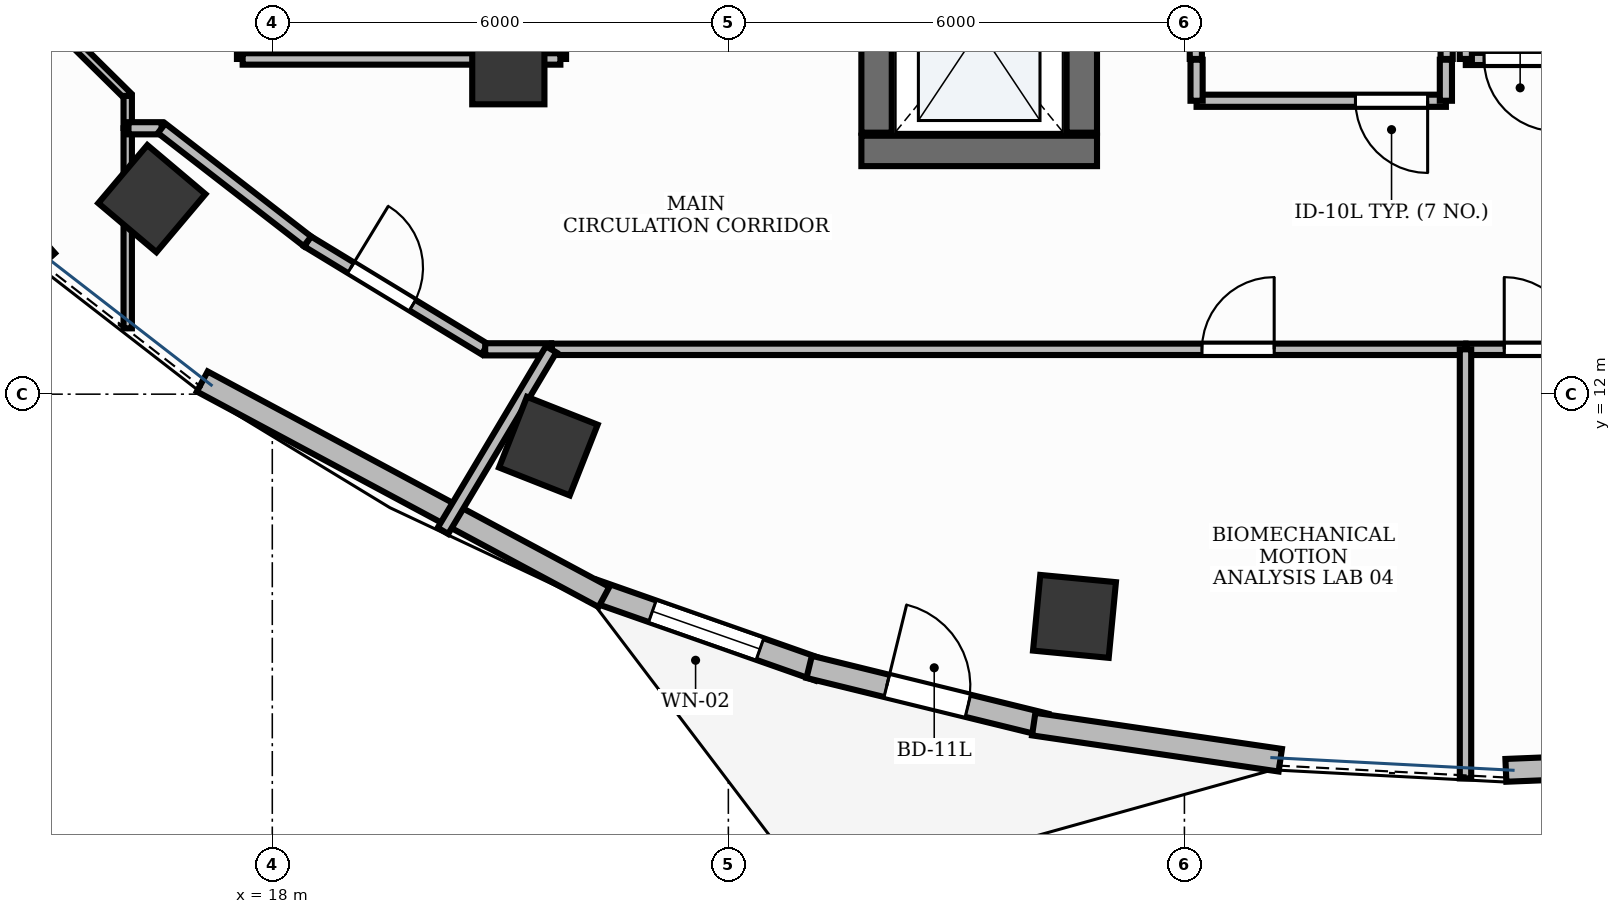
"""IFC4 building model, lengths in metres.
Left out: names, types, materials, properties, quantities, classifications, styles, units other than length and angle.
Written with IfcOpenShell. Run it as: python <this file> out.ifc"""

import sys

from ifc_helpers import new_model, si_unit, direction, frame, frame_2d, origin, origin_2d, place, context, subcontext, project, spatial, rectangle, extrude, element, fill, save


model = new_model("IFC4")
c1 = context("Model", 3, precision=1e-05, world=origin(), true_north=direction((0.0, 1.0)))
c2 = subcontext(c1, "Body", "Model", "MODEL_VIEW")
j1 = project(units=[si_unit("LENGTHUNIT", "METRE"), si_unit("PLANEANGLEUNIT", "RADIAN")], contexts=[c1])
p1 = place(None, origin())
s1 = spatial("IfcSite", under=j1, at=p1, CompositionType="ELEMENT")
p2 = place(p1, origin())
s2 = spatial("IfcBuilding", under=s1, at=p2, CompositionType="ELEMENT")
p3 = place(p2, frame((0.0, 0.0, 208.8)))
s3 = spatial("IfcBuildingStorey", under=s2, at=p3, CompositionType="ELEMENT", Elevation=208.8)
p4 = place(p3, frame((25.75, 15.2, 0.0), z_axis=(0.0, 0.0, 1.0), x_axis=(1.0, 0.0, 0.0)))
e1 = element("IfcWall", 1, at=p4, inside=s3, PredefinedType="SHEAR", context=c2, shape_type="SweptSolid", body=[
    extrude(rectangle(XDim=3.1, YDim=0.4, at=frame_2d((1.55, 0.0))), origin(), (0.0, 0.0, 1.0), 3.88),
])
for number, where, z_axis, x_axis in (
    (2, (25.95, 15.44, 0.0), (0.0, 0.0, 1.0), (0.0, 1.0, 0.0)),
    (3, (28.65, 15.44, 0.0), (0.0, 0.0, 1.0), (0.0, 1.0, 0.0)),
):
    element("IfcWall", number, at=place(p3, frame(where, z_axis=z_axis, x_axis=x_axis)), inside=s3, PredefinedType="SHEAR", context=c2, shape_type="SweptSolid", body=[
        extrude(rectangle(XDim=2.7, YDim=0.4, at=frame_2d((1.35, 0.0))), origin(), (0.0, 0.0, 1.0), 3.88),
    ])
p5 = place(p3, frame((16.416, 14.573, -0.0), z_axis=(0.0, 0.0, 1.0), x_axis=(-0.764246456939, 0.644924300253, 0.0)))
e4 = element("IfcColumn", 4, at=p5, inside=s3, PredefinedType="COLUMN", context=c2, shape_type="SweptSolid", body=[
    extrude(rectangle(XDim=1.0, YDim=1.0, at=origin_2d()), origin(), (0.0, 0.0, 1.0), 3.881),
])
p6 = place(p3, frame((21.105, 16.288, -0.0), z_axis=(0.0, 0.0, 1.0), x_axis=(1.0, 0.0, 0.0)))
e5 = element("IfcColumn", 5, at=p6, inside=s3, PredefinedType="COLUMN", context=c2, shape_type="SweptSolid", body=[
    extrude(rectangle(XDim=0.95, YDim=0.95, at=origin_2d()), origin(), (0.0, 0.0, 1.0), 3.881),
])
for number, where, z_axis, x_axis in (
    (6, (21.632, 11.316, -0.0), (0.0, 0.0, 1.0), (-0.93, 0.367, 0.0)),
    (7, (28.554, 9.076, -0.0), (0.0, 0.0, 1.0), (-0.995, 0.095, 0.0)),
):
    element("IfcColumn", number, at=place(p3, frame(where, z_axis=z_axis, x_axis=x_axis)), inside=s3, PredefinedType="COLUMN", context=c2, shape_type="SweptSolid", body=[
        extrude(rectangle(XDim=1.0, YDim=1.0, at=origin_2d()), origin(), (0.0, 0.0, 1.0), 3.881),
    ])
p7 = place(p3, frame((22.223, 9.417, 0.0), z_axis=(0.0, 0.0, 1.0), x_axis=(0.94341621231, -0.331610992506, 0.0)))
e8 = element("IfcWall", 8, at=p7, inside=s3, PredefinedType="STANDARD", context=c2, shape_type="SweptSolid", body=[
    extrude(rectangle(XDim=3.148, YDim=0.3, at=frame_2d((1.574, 0.0))), origin(), (0.0, 0.0, 1.0), 3.88),
])
p8 = place(p7, frame((0.824, 0.0, 0.95)))
e9 = element("IfcOpeningElement", 9, at=p8, cuts=e8, PredefinedType="OPENING", context=c2, shape_type="SweptSolid", body=[
    extrude(rectangle(XDim=1.5, YDim=1.8, at=frame_2d((0.75, 0.9))), frame((0.0, 0.165, 0.0), z_axis=(0.0, -1.0, 0.0), x_axis=(1.0, 0.0, 0.0)), (0.0, 0.0, 1.0), 0.33),
])
p9 = place(p3, frame((25.063, 8.412, 0.0), z_axis=(0.0, 0.0, 1.0), x_axis=(0.971262421812, -0.238011150948, 0.0)))
e10 = element("IfcWall", 10, at=p9, inside=s3, PredefinedType="STANDARD", context=c2, shape_type="SweptSolid", body=[
    extrude(rectangle(XDim=3.201, YDim=0.3, at=frame_2d((1.601, 0.0))), origin(), (0.0, 0.0, 1.0), 3.88),
])
p10 = place(p9, frame((1.051, 0.0, 0.0)))
e11 = element("IfcOpeningElement", 11, at=p10, cuts=e10, PredefinedType="OPENING", context=c2, shape_type="SweptSolid", body=[
    extrude(rectangle(XDim=1.1, YDim=2.15, at=frame_2d((0.55, 1.075))), frame((0.0, 0.165, 0.0), z_axis=(0.0, -1.0, 0.0), x_axis=(1.0, 0.0, 0.0)), (0.0, 0.0, 1.0), 0.33),
])
p11 = place(p3, frame((34.229, 7.051, 0.0), z_axis=(0.0, 0.0, 1.0), x_axis=(0.999187621273, 0.040300092979, 0.0)))
e12 = element("IfcWall", 12, at=p11, inside=s3, PredefinedType="STANDARD", context=c2, shape_type="SweptSolid", body=[
    extrude(rectangle(XDim=3.259, YDim=0.3, at=frame_2d((1.63, 0.0))), origin(), (0.0, 0.0, 1.0), 3.88),
])
p12 = place(p11, frame((0.88, 0.0, 0.95)))
e13 = element("IfcOpeningElement", 13, at=p12, cuts=e12, PredefinedType="OPENING", context=c2, shape_type="SweptSolid", body=[
    extrude(rectangle(XDim=1.5, YDim=1.8, at=frame_2d((0.75, 0.9))), frame((0.0, 0.165, 0.0), z_axis=(0.0, -1.0, 0.0), x_axis=(1.0, 0.0, 0.0)), (0.0, 0.0, 1.0), 0.33),
])
p13 = place(p3, frame((11.375, 17.851, 0.0), z_axis=(0.0, 0.0, 1.0), x_axis=(0.66549767703, -0.746399920866, 0.0)))
e14 = element("IfcWall", 14, at=p13, inside=s3, PredefinedType="STANDARD", context=c2, shape_type="SweptSolid", body=[
    extrude(rectangle(XDim=5.489, YDim=0.3, at=frame_2d((2.745, 0.0))), origin(), (0.0, 0.0, 1.0), 2.205),
])
p14 = place(p3, frame((17.079, 12.167, 0.0), z_axis=(0.0, 0.0, 1.0), x_axis=(0.88123472541, -0.472678917164, 0.0)))
e15 = element("IfcWall", 15, at=p14, inside=s3, PredefinedType="STANDARD", context=c2, shape_type="SweptSolid", body=[
    extrude(rectangle(XDim=5.997, YDim=0.3, at=frame_2d((2.998, 0.0))), origin(), (0.0, 0.0, 1.0), 2.205),
])
p15 = place(p3, frame((28.017, 7.659, 0.0), z_axis=(0.0, 0.0, 1.0), x_axis=(0.989444403328, -0.144912983283, 0.0)))
e16 = element("IfcWall", 16, at=p15, inside=s3, PredefinedType="STANDARD", context=c2, shape_type="SweptSolid", body=[
    extrude(rectangle(XDim=3.279, YDim=0.3, at=frame_2d((1.639, 0.0))), origin(), (0.0, 0.0, 1.0), 2.205),
])
p16 = place(p3, frame((33.44, 15.86, 0.0), z_axis=(0.0, 0.0, 1.0), x_axis=(-1.0, 0.0, 0.0)))
e17 = element("IfcWall", 17, at=p16, inside=s3, PredefinedType="PARTITIONING", context=c2, shape_type="SweptSolid", body=[
    extrude(rectangle(XDim=3.28, YDim=0.16, at=frame_2d((1.64, 0.0))), origin(), (0.0, 0.0, 1.0), 2.22),
])
p17 = place(p16, frame((0.24, 0.0, 0.0)))
e18 = element("IfcOpeningElement", 18, at=p17, cuts=e17, PredefinedType="OPENING", context=c2, shape_type="SweptSolid", body=[
    extrude(rectangle(XDim=0.95, YDim=2.15, at=frame_2d((0.475, 1.075))), frame((0.0, 0.095, 0.0), z_axis=(0.0, -1.0, 0.0), x_axis=(1.0, 0.0, 0.0)), (0.0, 0.0, 1.0), 0.19),
])
p18 = place(p3, frame((17.61, 16.41, 0.0), z_axis=(0.0, 0.0, 1.0), x_axis=(0.0, 1.0, 0.0)))
e19 = element("IfcWall", 19, at=p18, inside=s3, PredefinedType="PARTITIONING", context=c2, shape_type="SweptSolid", body=[
    extrude(rectangle(XDim=14.096, YDim=0.15, at=frame_2d((7.048, 0.0))), origin(), (0.0, 0.0, 1.0), 2.22),
])
p19 = place(p18, frame((5.132, 0.0, 0.0)))
e20 = element("IfcOpeningElement", 20, at=p19, cuts=e19, PredefinedType="OPENING", context=c2, shape_type="SweptSolid", body=[
    extrude(rectangle(XDim=0.95, YDim=2.15, at=frame_2d((0.475, 1.075))), frame((0.0, 0.09, 0.0), z_axis=(0.0, -1.0, 0.0), x_axis=(1.0, 0.0, 0.0)), (0.0, 0.0, 1.0), 0.18),
])
p20 = place(p3, frame((18.464, 14.01, 0.0), z_axis=(0.0, 0.0, 1.0), x_axis=(0.854383333884, -0.519643261076, 0.0)))
e21 = element("IfcWall", 21, at=p20, inside=s3, PredefinedType="PARTITIONING", context=c2, shape_type="SweptSolid", body=[
    extrude(rectangle(XDim=2.729, YDim=0.16, at=frame_2d((1.365, 0.0))), origin(), (0.0, 0.0, 1.0), 2.22),
])
p21 = place(p20, frame((0.667, 0.0, 0.0)))
e22 = element("IfcOpeningElement", 22, at=p21, cuts=e21, PredefinedType="OPENING", context=c2, shape_type="SweptSolid", body=[
    extrude(rectangle(XDim=0.95, YDim=2.15, at=frame_2d((0.475, 1.075))), frame((0.0, 0.095, 0.0), z_axis=(0.0, -1.0, 0.0), x_axis=(1.0, 0.0, 0.0)), (0.0, 0.0, 1.0), 0.19),
])
p22 = place(p3, frame((21.679, 12.59, 0.0), z_axis=(0.0, 0.0, 1.0), x_axis=(1.0, 0.0, 0.0)))
e23 = element("IfcWall", 23, at=p22, inside=s3, PredefinedType="PARTITIONING", context=c2, shape_type="SweptSolid", body=[
    extrude(rectangle(XDim=12.019, YDim=0.15, at=frame_2d((6.01, 0.0))), origin(), (0.0, 0.0, 1.0), 2.22),
])
p23 = place(p22, frame((8.552, 0.0, 0.0)))
e24 = element("IfcOpeningElement", 24, at=p23, cuts=e23, PredefinedType="OPENING", context=c2, shape_type="SweptSolid", body=[
    extrude(rectangle(XDim=0.95, YDim=2.15, at=frame_2d((0.475, 1.075))), frame((0.0, 0.09, 0.0), z_axis=(0.0, -1.0, 0.0), x_axis=(1.0, 0.0, 0.0)), (0.0, 0.0, 1.0), 0.18),
])
p24 = place(p3, frame((33.708, 12.59, 0.0), z_axis=(0.0, 0.0, 1.0), x_axis=(1.0, 0.0, 0.0)))
e25 = element("IfcWall", 25, at=p24, inside=s3, PredefinedType="PARTITIONING", context=c2, shape_type="SweptSolid", body=[
    extrude(rectangle(XDim=10.792, YDim=0.15, at=frame_2d((5.396, 0.0))), origin(), (0.0, 0.0, 1.0), 2.22),
])
p25 = place(p24, frame((0.5, 0.0, 0.0)))
e26 = element("IfcOpeningElement", 26, at=p25, cuts=e25, PredefinedType="OPENING", context=c2, shape_type="SweptSolid", body=[
    extrude(rectangle(XDim=0.95, YDim=2.15, at=frame_2d((0.475, 1.075))), frame((0.0, 0.09, 0.0), z_axis=(0.0, -1.0, 0.0), x_axis=(1.0, 0.0, 0.0)), (0.0, 0.0, 1.0), 0.18),
])
p26 = place(p3, frame((44.5, 16.41, 0.0), z_axis=(0.0, 0.0, 1.0), x_axis=(-1.0, 0.0, 0.0)))
e27 = element("IfcWall", 27, at=p26, inside=s3, PredefinedType="PARTITIONING", context=c2, shape_type="SweptSolid", body=[
    extrude(rectangle(XDim=10.798, YDim=0.16, at=frame_2d((5.399, 0.0))), origin(), (0.0, 0.0, 1.0), 2.22),
])
p27 = place(p26, frame((9.608, 0.0, 0.0)))
e28 = element("IfcOpeningElement", 28, at=p27, cuts=e27, PredefinedType="OPENING", context=c2, shape_type="SweptSolid", body=[
    extrude(rectangle(XDim=0.95, YDim=2.15, at=frame_2d((0.475, 1.075))), frame((0.0, 0.095, 0.0), z_axis=(0.0, -1.0, 0.0), x_axis=(1.0, 0.0, 0.0)), (0.0, 0.0, 1.0), 0.19),
])
for number, where, z_axis, x_axis in (
    (29, (33.44, 16.4, 0.0), (0.0, 0.0, 1.0), (0.0, -1.0, 0.0)),
    (30, (30.16, 15.86, 0.0), (0.0, 0.0, 1.0), (0.0, 1.0, 0.0)),
):
    element("IfcWall", number, at=place(p3, frame(where, z_axis=z_axis, x_axis=x_axis)), inside=s3, PredefinedType="PARTITIONING", context=c2, shape_type="SweptSolid", body=[
        extrude(rectangle(XDim=0.54, YDim=0.16, at=frame_2d((0.27, 0.0))), origin(), (0.0, 0.0, 1.0), 2.22),
    ])
for number, where, z_axis, x_axis in (
    (31, (30.15, 16.41, 0.0), (0.0, 0.0, 1.0), (0.0, 1.0, 0.0)),
    (32, (33.45, 18.09, 0.0), (0.0, 0.0, 1.0), (0.0, -1.0, 0.0)),
):
    element("IfcWall", number, at=place(p3, frame(where, z_axis=z_axis, x_axis=x_axis)), inside=s3, PredefinedType="PARTITIONING", context=c2, shape_type="SweptSolid", body=[
        extrude(rectangle(XDim=1.68, YDim=0.16, at=frame_2d((0.84, 0.0))), origin(), (0.0, 0.0, 1.0), 2.22),
    ])
p28 = place(p3, frame((14.761, 17.245, 0.0), z_axis=(0.0, 0.0, 1.0), x_axis=(0.711186701462, -0.703003183253, 0.0)))
e33 = element("IfcWall", 33, at=p28, inside=s3, PredefinedType="MOVABLE", context=c2, shape_type="SweptSolid", body=[
    extrude(rectangle(XDim=1.879, YDim=0.11, at=frame_2d((0.94, 0.0))), origin(), (0.0, 0.0, 1.0), 2.22),
])
p29 = place(p3, frame((16.098, 15.924, 0.0), z_axis=(0.0, 0.0, 1.0), x_axis=(0.0, -1.0, 0.0)))
e34 = element("IfcWall", 34, at=p29, inside=s3, PredefinedType="MOVABLE", context=c2, shape_type="SweptSolid", body=[
    extrude(rectangle(XDim=0.422, YDim=0.11, at=frame_2d((0.211, 0.0))), origin(), (0.0, 0.0, 1.0), 2.22),
])
p30 = place(p3, frame((16.098, 15.498, 0.0), z_axis=(0.0, 0.0, 1.0), x_axis=(0.0, -1.0, 0.0)))
e35 = element("IfcWall", 35, at=p30, inside=s3, PredefinedType="MOVABLE", context=c2, shape_type="SweptSolid", body=[
    extrude(rectangle(XDim=2.632, YDim=0.11, at=frame_2d((1.316, 0.0))), origin(), (0.0, 0.0, 1.0), 2.22),
])
p31 = place(p3, frame((21.79, 21.44, 0.0), z_axis=(0.0, 0.0, 1.0), x_axis=(0.0, -1.0, 0.0)))
e36 = element("IfcWall", 36, at=p31, inside=s3, PredefinedType="PARTITIONING", context=c2, shape_type="SweptSolid", body=[
    extrude(rectangle(XDim=5.03, YDim=0.15, at=frame_2d((2.515, 0.0))), origin(), (0.0, 0.0, 1.0), 2.22),
])
p32 = place(p3, frame((21.79, 16.41, 0.0), z_axis=(0.0, 0.0, 1.0), x_axis=(-1.0, 0.0, 0.0)))
e37 = element("IfcWall", 37, at=p32, inside=s3, PredefinedType="PARTITIONING", context=c2, shape_type="SweptSolid", body=[
    extrude(rectangle(XDim=4.18, YDim=0.15, at=frame_2d((2.09, 0.0))), origin(), (0.0, 0.0, 1.0), 2.22),
])
p33 = place(p3, frame((16.108, 15.498, 0.0), z_axis=(0.0, 0.0, 1.0), x_axis=(1.0, 0.0, 0.0)))
e38 = element("IfcWall", 38, at=p33, inside=s3, PredefinedType="PARTITIONING", context=c2, shape_type="SweptSolid", body=[
    extrude(rectangle(XDim=0.436, YDim=0.16, at=frame_2d((0.218, 0.0))), origin(), (0.0, 0.0, 1.0), 2.22),
])
p34 = place(p3, frame((16.544, 15.498, 0.0), z_axis=(0.0, 0.0, 1.0), x_axis=(0.790342017468, -0.612665892167, 0.0)))
e39 = element("IfcWall", 39, at=p34, inside=s3, PredefinedType="PARTITIONING", context=c2, shape_type="SweptSolid", body=[
    extrude(rectangle(XDim=2.428, YDim=0.16, at=frame_2d((1.214, 0.0))), origin(), (0.0, 0.0, 1.0), 2.22),
])
p35 = place(p3, frame((20.801, 12.59, 0.0), z_axis=(0.0, 0.0, 1.0), x_axis=(1.0, 0.0, 0.0)))
e40 = element("IfcWall", 40, at=p35, inside=s3, PredefinedType="PARTITIONING", context=c2, shape_type="SweptSolid", body=[
    extrude(rectangle(XDim=0.868, YDim=0.16, at=frame_2d((0.434, 0.0))), origin(), (0.0, 0.0, 1.0), 2.22),
])
p36 = place(p3, frame((21.669, 12.59, 0.0), z_axis=(0.0, 0.0, 1.0), x_axis=(-0.51209195038, -0.858930634194, 0.0)))
e41 = element("IfcWall", 41, at=p36, inside=s3, PredefinedType="PARTITIONING", context=c2, shape_type="SweptSolid", body=[
    extrude(rectangle(XDim=2.781, YDim=0.16, at=frame_2d((1.39, 0.0))), origin(), (0.0, 0.0, 1.0), 2.22),
])
p37 = place(p3, frame((33.698, 12.59, 0.0), z_axis=(0.0, 0.0, 1.0), x_axis=(0.0, -1.0, 0.0)))
e42 = element("IfcWall", 42, at=p37, inside=s3, PredefinedType="PARTITIONING", context=c2, shape_type="SweptSolid", body=[
    extrude(rectangle(XDim=5.645, YDim=0.15, at=frame_2d((2.823, 0.0))), origin(), (0.0, 0.0, 1.0), 2.22),
])
p38 = place(p3, frame((33.702, 16.41, 0.0), z_axis=(0.0, 0.0, 1.0), x_axis=(0.0, 1.0, 0.0)))
e43 = element("IfcWall", 43, at=p38, inside=s3, PredefinedType="PARTITIONING", context=c2, shape_type="SweptSolid", body=[
    extrude(rectangle(XDim=1.68, YDim=0.16, at=frame_2d((0.84, 0.0))), origin(), (0.0, 0.0, 1.0), 2.22),
])
p39 = place(p8, origin())
e44 = element("IfcWindow", 44, at=p39, inside=s3, PartitioningType="DOUBLE_PANEL_VERTICAL", PredefinedType="WINDOW", context=c2, shape_type="SweptSolid", body=[
    extrude(rectangle(XDim=1.5, YDim=1.8, at=frame_2d((0.75, 0.9))), frame((0.0, 0.03, 0.0), z_axis=(0.0, -1.0, 0.0), x_axis=(1.0, 0.0, 0.0)), (0.0, 0.0, 1.0), 0.06),
])
fill(e9, e44)
p40 = place(p10, origin())
e45 = element("IfcDoor", 45, at=p40, inside=s3, OperationType="SINGLE_SWING_LEFT", PredefinedType="DOOR", context=c2, shape_type="SweptSolid", body=[
    extrude(rectangle(XDim=1.1, YDim=2.15, at=frame_2d((0.55, 1.075))), frame((0.0, 0.025, 0.0), z_axis=(0.0, -1.0, 0.0), x_axis=(1.0, 0.0, 0.0)), (0.0, 0.0, 1.0), 0.05),
])
fill(e11, e45)
p41 = place(p17, origin())
e46 = element("IfcDoor", 46, at=p41, inside=s3, OperationType="SINGLE_SWING_LEFT", PredefinedType="DOOR", context=c2, shape_type="SweptSolid", body=[
    extrude(rectangle(XDim=0.95, YDim=2.15, at=frame_2d((0.475, 1.075))), frame((0.0, 0.025, 0.0), z_axis=(0.0, -1.0, 0.0), x_axis=(1.0, 0.0, 0.0)), (0.0, 0.0, 1.0), 0.05),
])
fill(e18, e46)
p42 = place(p21, origin())
e47 = element("IfcDoor", 47, at=p42, inside=s3, OperationType="SINGLE_SWING_LEFT", PredefinedType="DOOR", context=c2, shape_type="SweptSolid", body=[
    extrude(rectangle(XDim=0.95, YDim=2.15, at=frame_2d((0.475, 1.075))), frame((0.0, 0.025, 0.0), z_axis=(0.0, -1.0, 0.0), x_axis=(1.0, 0.0, 0.0)), (0.0, 0.0, 1.0), 0.05),
])
fill(e22, e47)
p43 = place(p23, origin())
e48 = element("IfcDoor", 48, at=p43, inside=s3, OperationType="SINGLE_SWING_RIGHT", PredefinedType="DOOR", context=c2, shape_type="SweptSolid", body=[
    extrude(rectangle(XDim=0.95, YDim=2.15, at=frame_2d((0.475, 1.075))), frame((0.0, 0.025, 0.0), z_axis=(0.0, -1.0, 0.0), x_axis=(1.0, 0.0, 0.0)), (0.0, 0.0, 1.0), 0.05),
])
fill(e24, e48)
p44 = place(p25, origin())
e49 = element("IfcDoor", 49, at=p44, inside=s3, OperationType="SINGLE_SWING_LEFT", PredefinedType="DOOR", context=c2, shape_type="SweptSolid", body=[
    extrude(rectangle(XDim=0.95, YDim=2.15, at=frame_2d((0.475, 1.075))), frame((0.0, 0.025, 0.0), z_axis=(0.0, -1.0, 0.0), x_axis=(1.0, 0.0, 0.0)), (0.0, 0.0, 1.0), 0.05),
])
fill(e26, e49)
p45 = place(p27, origin())
e50 = element("IfcDoor", 50, at=p45, inside=s3, OperationType="SINGLE_SWING_LEFT", PredefinedType="DOOR", context=c2, shape_type="SweptSolid", body=[
    extrude(rectangle(XDim=0.95, YDim=2.15, at=frame_2d((0.475, 1.075))), frame((0.0, 0.025, 0.0), z_axis=(0.0, -1.0, 0.0), x_axis=(1.0, 0.0, 0.0)), (0.0, 0.0, 1.0), 0.05),
])
fill(e28, e50)
save(model, sys.argv[1])
